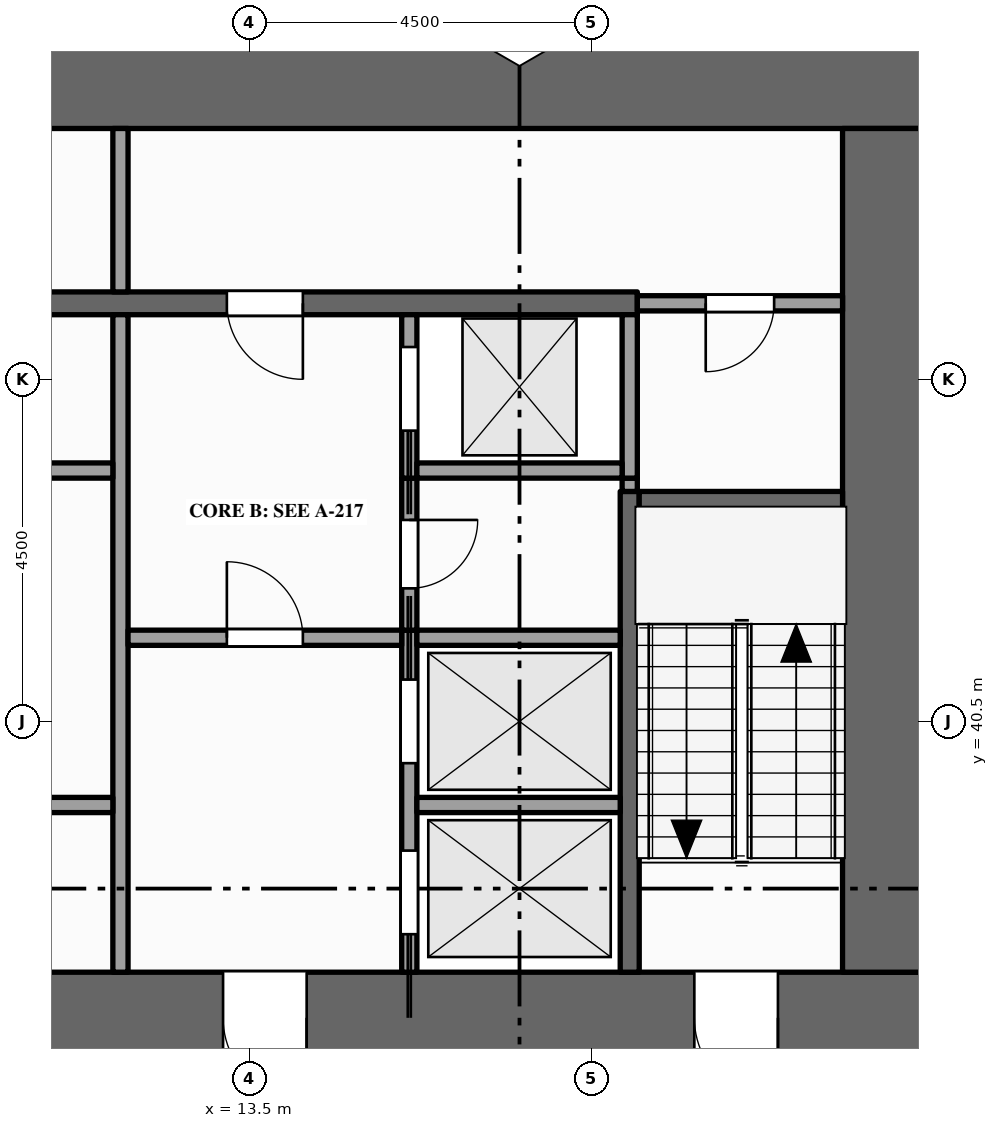
"""IFC4 building model, lengths in metres.
Left out: names, types, materials, properties, quantities, classifications, styles, units other than length and angle.
Written with IfcOpenShell. Run it as: python <this file> out.ifc"""

import sys

from ifc_helpers import new_model, si_unit, direction, frame, frame_2d, origin, place, context, subcontext, project, spatial, rectangle, extrude, element, fill, save


model = new_model("IFC4")
c1 = context("Model", 3, precision=1e-05, world=origin(), true_north=direction((0.0, 1.0)))
c2 = subcontext(c1, "Body", "Model", "MODEL_VIEW")
j1 = project(units=[si_unit("LENGTHUNIT", "METRE"), si_unit("PLANEANGLEUNIT", "RADIAN")], contexts=[c1])
p1 = place(None, origin())
s1 = spatial("IfcSite", under=j1, at=p1, CompositionType="ELEMENT")
p2 = place(p1, origin())
s2 = spatial("IfcBuilding", under=s1, at=p2, CompositionType="ELEMENT")
p3 = place(p2, frame((0.0, 0.0, 95.0)))
s3 = spatial("IfcBuildingStorey", under=s2, at=p3, CompositionType="ELEMENT", Elevation=95.0)
p4 = place(p3, frame((0.0, 36.6, -0.15), z_axis=(0.0, 0.0, 1.0), x_axis=(1.0, 0.0, 0.0)))
e1 = element("IfcWall", 1, at=p4, inside=s3, PredefinedType="SHEAR", context=c2, shape_type="SweptSolid", body=[
    extrude(rectangle(XDim=22.5, YDim=1.2, at=frame_2d((11.25, 0.0))), origin(), (0.0, 0.0, 1.0), 4.0),
])
p5 = place(p4, frame((7.1, 0.0, 0.15)))
e2 = element("IfcOpeningElement", 2, at=p5, cuts=e1, PredefinedType="OPENING", context=c2, shape_type="SweptSolid", body=[
    extrude(rectangle(XDim=1.8, YDim=2.1, at=frame_2d((0.9, 1.05))), frame((0.0, 0.61, 0.0), z_axis=(0.0, -1.0, 0.0), x_axis=(1.0, 0.0, 0.0)), (0.0, 0.0, 1.0), 1.22),
])
p6 = place(p4, frame((13.15, 0.0, 0.15)))
e3 = element("IfcOpeningElement", 3, at=p6, cuts=e1, PredefinedType="OPENING", context=c2, shape_type="SweptSolid", body=[
    extrude(rectangle(XDim=1.1, YDim=2.1, at=frame_2d((0.55, 1.05))), frame((0.0, 0.61, 0.0), z_axis=(0.0, -1.0, 0.0), x_axis=(1.0, 0.0, 0.0)), (0.0, 0.0, 1.0), 1.22),
])
p7 = place(p4, frame((2.15, 0.0, 0.15)))
e4 = element("IfcOpeningElement", 4, at=p7, cuts=e1, PredefinedType="OPENING", context=c2, shape_type="SweptSolid", body=[
    extrude(rectangle(XDim=1.1, YDim=2.1, at=frame_2d((0.55, 1.05))), frame((0.0, 0.61, 0.0), z_axis=(0.0, -1.0, 0.0), x_axis=(1.0, 0.0, 0.0)), (0.0, 0.0, 1.0), 1.22),
])
p8 = place(p4, frame((19.35, 0.0, 0.15)))
e5 = element("IfcOpeningElement", 5, at=p8, cuts=e1, PredefinedType="OPENING", context=c2, shape_type="SweptSolid", body=[
    extrude(rectangle(XDim=1.1, YDim=2.1, at=frame_2d((0.55, 1.05))), frame((0.0, 0.61, 0.0), z_axis=(0.0, -1.0, 0.0), x_axis=(1.0, 0.0, 0.0)), (0.0, 0.0, 1.0), 1.22),
])
p9 = place(p3, frame((0.0, 48.9, -0.15), z_axis=(0.0, 0.0, 1.0), x_axis=(1.0, 0.0, 0.0)))
e6 = element("IfcWall", 6, at=p9, inside=s3, PredefinedType="SHEAR", context=c2, shape_type="SweptSolid", body=[
    extrude(rectangle(XDim=22.5, YDim=1.2, at=frame_2d((11.25, 0.0))), origin(), (0.0, 0.0, 1.0), 4.0),
])
p10 = place(p3, frame((21.9, 37.2, -0.15), z_axis=(0.0, 0.0, 1.0), x_axis=(0.0, 1.0, 0.0)))
e7 = element("IfcWall", 7, at=p10, inside=s3, PredefinedType="SHEAR", context=c2, shape_type="SweptSolid", body=[
    extrude(rectangle(XDim=11.1, YDim=1.2, at=frame_2d((5.55, 0.0))), origin(), (0.0, 0.0, 1.0), 4.0),
])
p11 = place(p3, frame((11.8, 37.2, 0.0), z_axis=(0.0, 0.0, 1.0), x_axis=(0.0, 1.0, 0.0)))
e8 = element("IfcWall", 8, at=p11, inside=s3, PredefinedType="PARTITIONING", context=c2, shape_type="SweptSolid", body=[
    extrude(rectangle(XDim=8.65, YDim=0.2, at=frame_2d((4.325, 0.0))), origin(), (0.0, 0.0, 1.0), 3.85),
])
p12 = place(p3, frame((11.8, 46.15, 0.0), z_axis=(0.0, 0.0, 1.0), x_axis=(0.0, 1.0, 0.0)))
e9 = element("IfcWall", 9, at=p12, inside=s3, PredefinedType="PARTITIONING", context=c2, shape_type="SweptSolid", body=[
    extrude(rectangle(XDim=2.15, YDim=0.2, at=frame_2d((1.075, 0.0))), origin(), (0.0, 0.0, 1.0), 3.85),
])
p13 = place(p3, frame((15.6, 37.2, 0.0), z_axis=(0.0, 0.0, 1.0), x_axis=(0.0, 1.0, 0.0)))
e10 = element("IfcWall", 10, at=p13, inside=s3, PredefinedType="SOLIDWALL", context=c2, shape_type="SweptSolid", body=[
    extrude(rectangle(XDim=4.5, YDim=0.2, at=frame_2d((2.25, 0.0))), origin(), (0.0, 0.0, 1.0), 3.85),
])
p14 = place(p13, frame((0.5, 0.0, 0.012)))
e11 = element("IfcOpeningElement", 11, at=p14, cuts=e10, PredefinedType="OPENING", context=c2, shape_type="SweptSolid", body=[
    extrude(rectangle(XDim=1.1, YDim=2.1, at=frame_2d((0.55, 1.05))), frame((0.0, 0.11, 0.0), z_axis=(0.0, -1.0, 0.0), x_axis=(1.0, 0.0, 0.0)), (0.0, 0.0, 1.0), 0.22),
])
p15 = place(p13, frame((2.75, 0.0, 0.012)))
e12 = element("IfcOpeningElement", 12, at=p15, cuts=e10, PredefinedType="OPENING", context=c2, shape_type="SweptSolid", body=[
    extrude(rectangle(XDim=1.1, YDim=2.1, at=frame_2d((0.55, 1.05))), frame((0.0, 0.11, 0.0), z_axis=(0.0, -1.0, 0.0), x_axis=(1.0, 0.0, 0.0)), (0.0, 0.0, 1.0), 0.22),
])
p16 = place(p3, frame((15.6, 41.7, 0.0), z_axis=(0.0, 0.0, 1.0), x_axis=(0.0, 1.0, 0.0)))
e13 = element("IfcWall", 13, at=p16, inside=s3, PredefinedType="PARTITIONING", context=c2, shape_type="SweptSolid", body=[
    extrude(rectangle(XDim=2.0, YDim=0.2, at=frame_2d((1.0, 0.0))), origin(), (0.0, 0.0, 1.0), 3.85),
])
p17 = place(p16, frame((0.55, 0.0, 0.0)))
e14 = element("IfcOpeningElement", 14, at=p17, cuts=e13, PredefinedType="OPENING", context=c2, shape_type="SweptSolid", body=[
    extrude(rectangle(XDim=0.9, YDim=2.1, at=frame_2d((0.45, 1.05))), frame((0.0, 0.11, 0.0), z_axis=(0.0, -1.0, 0.0), x_axis=(1.0, 0.0, 0.0)), (0.0, 0.0, 1.0), 0.22),
])
p18 = place(p3, frame((15.6, 43.7, 0.0), z_axis=(0.0, 0.0, 1.0), x_axis=(0.0, 1.0, 0.0)))
e15 = element("IfcWall", 15, at=p18, inside=s3, PredefinedType="SOLIDWALL", context=c2, shape_type="SweptSolid", body=[
    extrude(rectangle(XDim=2.15, YDim=0.2, at=frame_2d((1.075, 0.0))), origin(), (0.0, 0.0, 1.0), 3.85),
])
p19 = place(p18, frame((0.625, 0.0, 0.012)))
e16 = element("IfcOpeningElement", 16, at=p19, cuts=e15, PredefinedType="OPENING", context=c2, shape_type="SweptSolid", body=[
    extrude(rectangle(XDim=1.1, YDim=2.1, at=frame_2d((0.55, 1.05))), frame((0.0, 0.11, 0.0), z_axis=(0.0, -1.0, 0.0), x_axis=(1.0, 0.0, 0.0)), (0.0, 0.0, 1.0), 0.22),
])
p20 = place(p3, frame((18.5, 37.2, 0.0), z_axis=(0.0, 0.0, 1.0), x_axis=(0.0, 1.0, 0.0)))
e17 = element("IfcWall", 17, at=p20, inside=s3, PredefinedType="SHEAR", context=c2, shape_type="SweptSolid", body=[
    extrude(rectangle(XDim=6.325, YDim=0.25, at=frame_2d((3.163, 0.0))), origin(), (0.0, 0.0, 1.0), 3.85),
])
p21 = place(p3, frame((18.5, 43.525, 0.0), z_axis=(0.0, 0.0, 1.0), x_axis=(0.0, 1.0, 0.0)))
e18 = element("IfcWall", 18, at=p21, inside=s3, PredefinedType="PARTITIONING", context=c2, shape_type="SweptSolid", body=[
    extrude(rectangle(XDim=0.175, YDim=0.2, at=frame_2d((0.087, 0.0))), origin(), (0.0, 0.0, 1.0), 3.85),
])
p22 = place(p3, frame((18.5, 43.7, 0.0), z_axis=(0.0, 0.0, 1.0), x_axis=(0.0, 1.0, 0.0)))
e19 = element("IfcWall", 19, at=p22, inside=s3, PredefinedType="SOLIDWALL", context=c2, shape_type="SweptSolid", body=[
    extrude(rectangle(XDim=2.15, YDim=0.2, at=frame_2d((1.075, 0.0))), origin(), (0.0, 0.0, 1.0), 3.85),
])
p23 = place(p3, frame((9.5, 39.4, 0.0), z_axis=(0.0, 0.0, 1.0), x_axis=(1.0, 0.0, 0.0)))
e20 = element("IfcWall", 20, at=p23, inside=s3, PredefinedType="PARTITIONING", context=c2, shape_type="SweptSolid", body=[
    extrude(rectangle(XDim=2.2, YDim=0.2, at=frame_2d((1.1, 0.0))), origin(), (0.0, 0.0, 1.0), 3.85),
])
p24 = place(p3, frame((15.7, 39.4, 0.0), z_axis=(0.0, 0.0, 1.0), x_axis=(1.0, 0.0, 0.0)))
e21 = element("IfcWall", 21, at=p24, inside=s3, PredefinedType="SOLIDWALL", context=c2, shape_type="SweptSolid", body=[
    extrude(rectangle(XDim=2.675, YDim=0.2, at=frame_2d((1.337, 0.0))), origin(), (0.0, 0.0, 1.0), 3.85),
])
p25 = place(p3, frame((11.9, 41.6, 0.0), z_axis=(0.0, 0.0, 1.0), x_axis=(1.0, 0.0, 0.0)))
e22 = element("IfcWall", 22, at=p25, inside=s3, PredefinedType="PARTITIONING", context=c2, shape_type="SweptSolid", body=[
    extrude(rectangle(XDim=3.6, YDim=0.2, at=frame_2d((1.8, 0.0))), origin(), (0.0, 0.0, 1.0), 3.85),
])
p26 = place(p25, frame((1.3, 0.0, 0.0)))
e23 = element("IfcOpeningElement", 23, at=p26, cuts=e22, PredefinedType="OPENING", context=c2, shape_type="SweptSolid", body=[
    extrude(rectangle(XDim=1.0, YDim=2.1, at=frame_2d((0.5, 1.05))), frame((0.0, 0.11, 0.0), z_axis=(0.0, -1.0, 0.0), x_axis=(1.0, 0.0, 0.0)), (0.0, 0.0, 1.0), 0.22),
])
p27 = place(p3, frame((15.7, 41.6, 0.0), z_axis=(0.0, 0.0, 1.0), x_axis=(1.0, 0.0, 0.0)))
e24 = element("IfcWall", 24, at=p27, inside=s3, PredefinedType="SOLIDWALL", context=c2, shape_type="SweptSolid", body=[
    extrude(rectangle(XDim=2.675, YDim=0.2, at=frame_2d((1.337, 0.0))), origin(), (0.0, 0.0, 1.0), 3.85),
])
p28 = place(p3, frame((18.625, 43.4, 0.0), z_axis=(0.0, 0.0, 1.0), x_axis=(1.0, 0.0, 0.0)))
e25 = element("IfcWall", 25, at=p28, inside=s3, PredefinedType="SHEAR", context=c2, shape_type="SweptSolid", body=[
    extrude(rectangle(XDim=2.675, YDim=0.25, at=frame_2d((1.337, 0.0))), origin(), (0.0, 0.0, 1.0), 3.85),
])
p29 = place(p3, frame((9.5, 43.8, 0.0), z_axis=(0.0, 0.0, 1.0), x_axis=(1.0, 0.0, 0.0)))
e26 = element("IfcWall", 26, at=p29, inside=s3, PredefinedType="PARTITIONING", context=c2, shape_type="SweptSolid", body=[
    extrude(rectangle(XDim=2.2, YDim=0.2, at=frame_2d((1.1, 0.0))), origin(), (0.0, 0.0, 1.0), 3.85),
])
p30 = place(p3, frame((15.7, 43.8, 0.0), z_axis=(0.0, 0.0, 1.0), x_axis=(1.0, 0.0, 0.0)))
e27 = element("IfcWall", 27, at=p30, inside=s3, PredefinedType="SOLIDWALL", context=c2, shape_type="SweptSolid", body=[
    extrude(rectangle(XDim=2.7, YDim=0.2, at=frame_2d((1.35, 0.0))), origin(), (0.0, 0.0, 1.0), 3.85),
])
p31 = place(p3, frame((4.1, 46.0, 0.0), z_axis=(0.0, 0.0, 1.0), x_axis=(1.0, 0.0, 0.0)))
e28 = element("IfcWall", 28, at=p31, inside=s3, PredefinedType="SHEAR", context=c2, shape_type="SweptSolid", body=[
    extrude(rectangle(XDim=14.5, YDim=0.3, at=frame_2d((7.25, 0.0))), origin(), (0.0, 0.0, 1.0), 3.85),
])
p32 = place(p31, frame((3.4, 0.0, 0.0)))
e29 = element("IfcOpeningElement", 29, at=p32, cuts=e28, PredefinedType="OPENING", context=c2, shape_type="SweptSolid", body=[
    extrude(rectangle(XDim=1.0, YDim=2.1, at=frame_2d((0.5, 1.05))), frame((0.0, 0.16, 0.0), z_axis=(0.0, -1.0, 0.0), x_axis=(1.0, 0.0, 0.0)), (0.0, 0.0, 1.0), 0.32),
])
p33 = place(p31, frame((9.1, 0.0, 0.0)))
e30 = element("IfcOpeningElement", 30, at=p33, cuts=e28, PredefinedType="OPENING", context=c2, shape_type="SweptSolid", body=[
    extrude(rectangle(XDim=1.0, YDim=2.1, at=frame_2d((0.5, 1.05))), frame((0.0, 0.16, 0.0), z_axis=(0.0, -1.0, 0.0), x_axis=(1.0, 0.0, 0.0)), (0.0, 0.0, 1.0), 0.32),
])
p34 = place(p3, frame((18.6, 46.0, 0.0), z_axis=(0.0, 0.0, 1.0), x_axis=(1.0, 0.0, 0.0)))
e31 = element("IfcWall", 31, at=p34, inside=s3, PredefinedType="PARTITIONING", context=c2, shape_type="SweptSolid", body=[
    extrude(rectangle(XDim=2.7, YDim=0.2, at=frame_2d((1.35, 0.0))), origin(), (0.0, 0.0, 1.0), 3.85),
])
p35 = place(p34, frame((0.9, 0.0, 0.0)))
e32 = element("IfcOpeningElement", 32, at=p35, cuts=e31, PredefinedType="OPENING", context=c2, shape_type="SweptSolid", body=[
    extrude(rectangle(XDim=0.9, YDim=2.1, at=frame_2d((0.45, 1.05))), frame((0.0, 0.11, 0.0), z_axis=(0.0, -1.0, 0.0), x_axis=(1.0, 0.0, 0.0)), (0.0, 0.0, 1.0), 0.22),
])
p36 = place(p14, origin())
e33 = element("IfcDoor", 33, at=p36, inside=s3, OperationType="SLIDING_TO_LEFT", PredefinedType="DOOR", context=c2, shape_type="SweptSolid", body=[
    extrude(rectangle(XDim=1.1, YDim=2.1, at=frame_2d((0.55, 1.05))), frame((0.0, 0.025, 0.0), z_axis=(0.0, -1.0, 0.0), x_axis=(1.0, 0.0, 0.0)), (0.0, 0.0, 1.0), 0.05),
])
fill(e11, e33)
p37 = place(p15, origin())
e34 = element("IfcDoor", 34, at=p37, inside=s3, OperationType="SLIDING_TO_RIGHT", PredefinedType="DOOR", context=c2, shape_type="SweptSolid", body=[
    extrude(rectangle(XDim=1.1, YDim=2.1, at=frame_2d((0.55, 1.05))), frame((0.0, 0.025, 0.0), z_axis=(0.0, -1.0, 0.0), x_axis=(1.0, 0.0, 0.0)), (0.0, 0.0, 1.0), 0.05),
])
fill(e12, e34)
p38 = place(p19, origin())
e35 = element("IfcDoor", 35, at=p38, inside=s3, OperationType="SLIDING_TO_LEFT", PredefinedType="DOOR", context=c2, shape_type="SweptSolid", body=[
    extrude(rectangle(XDim=1.1, YDim=2.1, at=frame_2d((0.55, 1.05))), frame((0.0, 0.025, 0.0), z_axis=(0.0, -1.0, 0.0), x_axis=(1.0, 0.0, 0.0)), (0.0, 0.0, 1.0), 0.05),
])
fill(e16, e35)
p39 = place(p6, origin())
e36 = element("IfcDoor", 36, at=p39, inside=s3, OperationType="SINGLE_SWING_RIGHT", PredefinedType="DOOR", context=c2, shape_type="SweptSolid", body=[
    extrude(rectangle(XDim=1.1, YDim=2.1, at=frame_2d((0.55, 1.05))), frame((0.0, 0.025, 0.0), z_axis=(0.0, -1.0, 0.0), x_axis=(1.0, 0.0, 0.0)), (0.0, 0.0, 1.0), 0.05),
])
fill(e3, e36)
p40 = place(p26, origin())
e37 = element("IfcDoor", 37, at=p40, inside=s3, OperationType="SINGLE_SWING_LEFT", PredefinedType="DOOR", context=c2, shape_type="SweptSolid", body=[
    extrude(rectangle(XDim=1.0, YDim=2.1, at=frame_2d((0.5, 1.05))), frame((0.0, 0.025, 0.0), z_axis=(0.0, -1.0, 0.0), x_axis=(1.0, 0.0, 0.0)), (0.0, 0.0, 1.0), 0.05),
])
fill(e23, e37)
p41 = place(p33, origin())
e38 = element("IfcDoor", 38, at=p41, inside=s3, OperationType="SINGLE_SWING_RIGHT", PredefinedType="DOOR", context=c2, shape_type="SweptSolid", body=[
    extrude(rectangle(XDim=1.0, YDim=2.1, at=frame_2d((0.5, 1.05))), frame((0.0, 0.025, 0.0), z_axis=(0.0, -1.0, 0.0), x_axis=(1.0, 0.0, 0.0)), (0.0, 0.0, 1.0), 0.05),
])
fill(e30, e38)
p42 = place(p8, origin())
e39 = element("IfcDoor", 39, at=p42, inside=s3, OperationType="SINGLE_SWING_RIGHT", PredefinedType="DOOR", context=c2, shape_type="SweptSolid", body=[
    extrude(rectangle(XDim=1.1, YDim=2.1, at=frame_2d((0.55, 1.05))), frame((0.0, 0.025, 0.0), z_axis=(0.0, -1.0, 0.0), x_axis=(1.0, 0.0, 0.0)), (0.0, 0.0, 1.0), 0.05),
])
fill(e5, e39)
p43 = place(p35, origin())
e40 = element("IfcDoor", 40, at=p43, inside=s3, OperationType="SINGLE_SWING_LEFT", PredefinedType="DOOR", context=c2, shape_type="SweptSolid", body=[
    extrude(rectangle(XDim=0.9, YDim=2.1, at=frame_2d((0.45, 1.05))), frame((0.0, 0.025, 0.0), z_axis=(0.0, -1.0, 0.0), x_axis=(1.0, 0.0, 0.0)), (0.0, 0.0, 1.0), 0.05),
])
fill(e32, e40)
p44 = place(p17, origin())
e41 = element("IfcDoor", 41, at=p44, inside=s3, OperationType="SINGLE_SWING_RIGHT", PredefinedType="DOOR", context=c2, shape_type="SweptSolid", body=[
    extrude(rectangle(XDim=0.9, YDim=2.1, at=frame_2d((0.45, 1.05))), frame((0.0, 0.025, 0.0), z_axis=(0.0, -1.0, 0.0), x_axis=(1.0, 0.0, 0.0)), (0.0, 0.0, 1.0), 0.05),
])
fill(e14, e41)
save(model, sys.argv[1])
